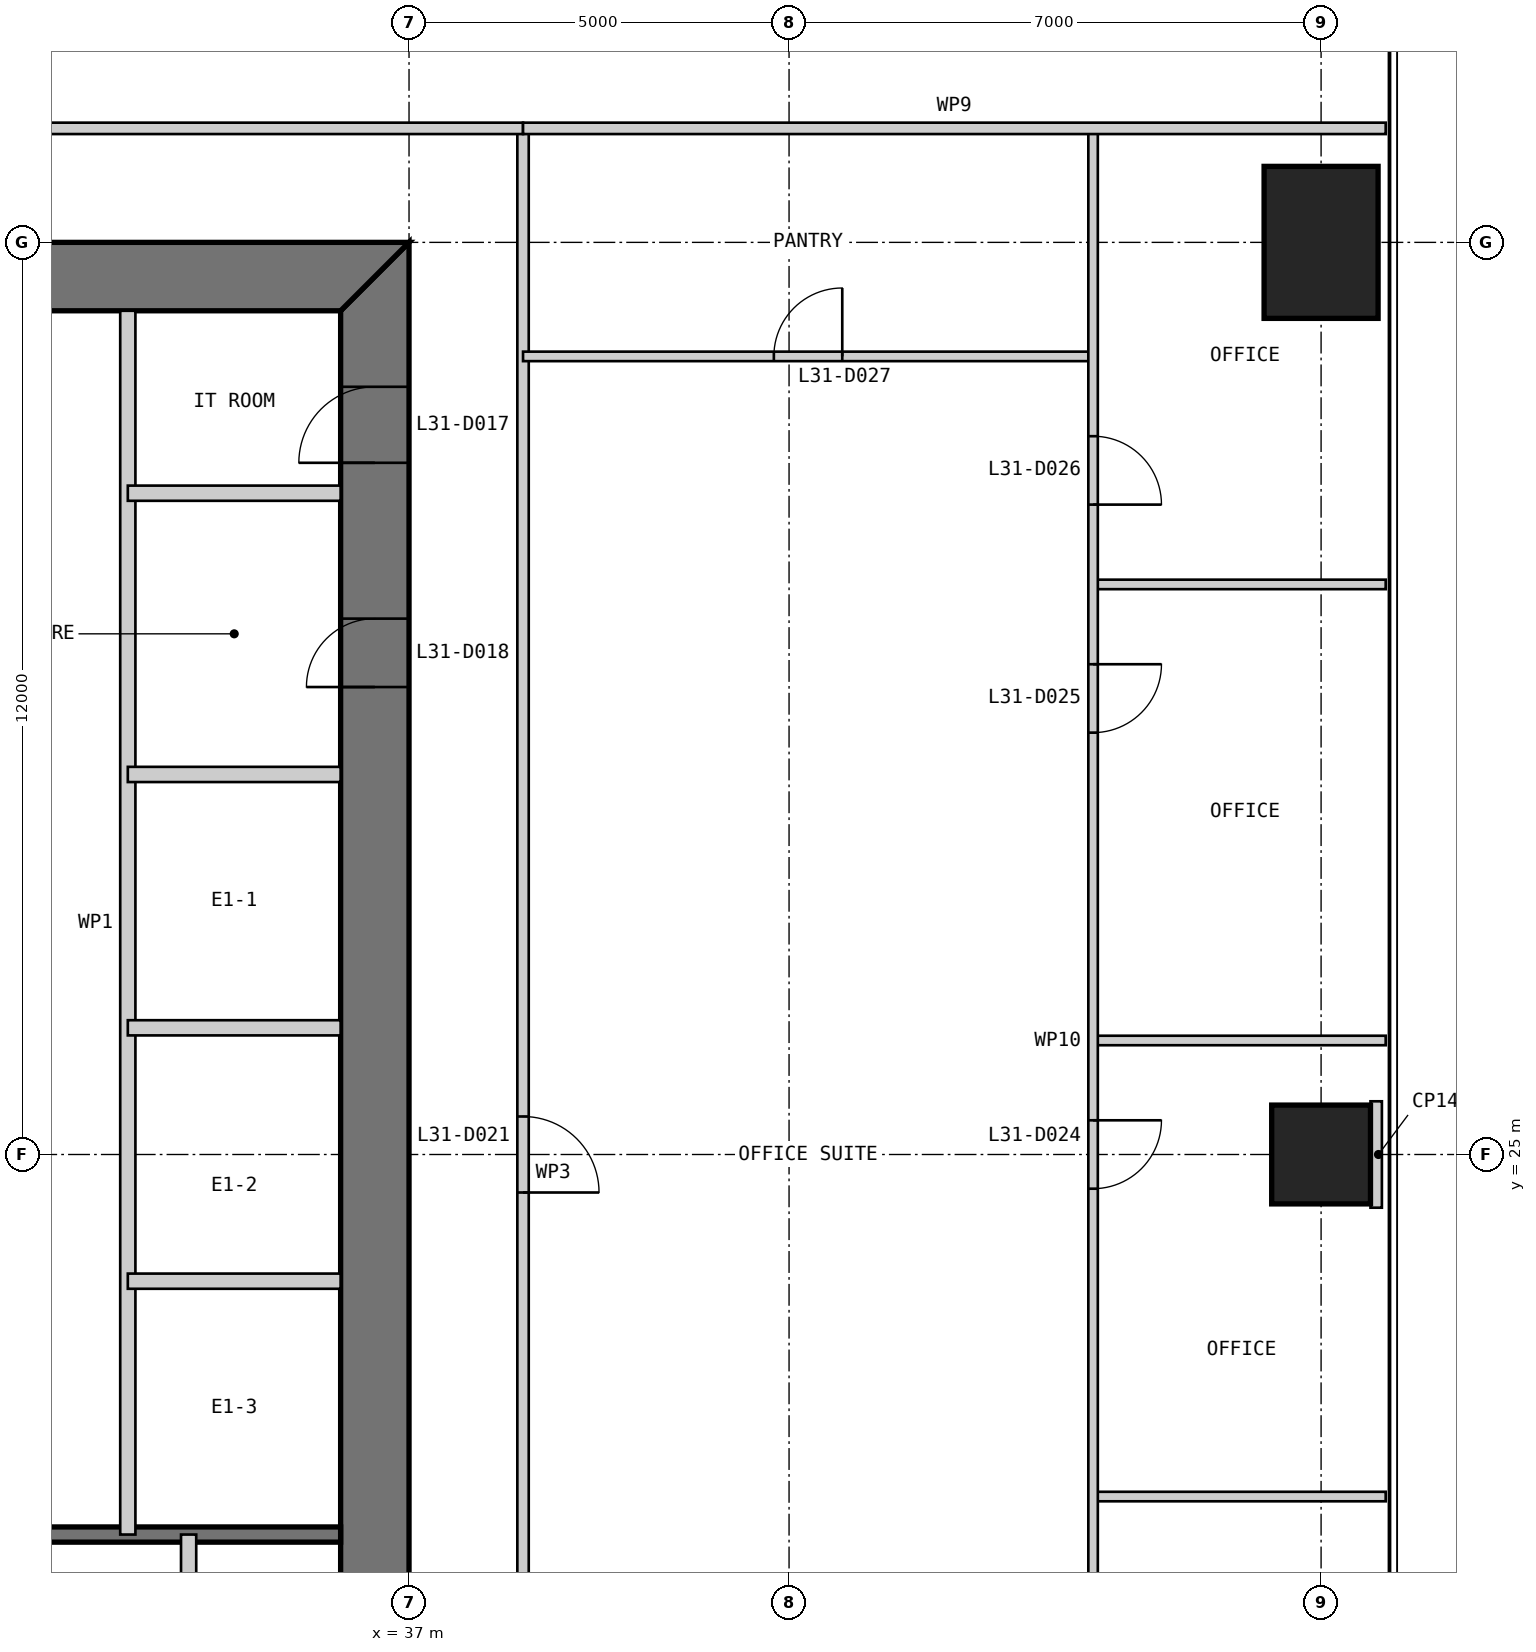
"""IFC4 building model, lengths in metres.
Left out: names, types, materials, properties, quantities, classifications, styles, units other than length and angle.
Written with IfcOpenShell. Run it as: python <this file> out.ifc"""

import sys

from ifc_helpers import new_model, si_unit, direction, frame, frame_2d, origin, origin_2d, place, context, subcontext, project, spatial, polyline, rectangle, outline, extrude, element, fill, save


model = new_model("IFC4")
c1 = context("Model", 3, precision=1e-05, world=origin(), true_north=direction((0.0, 1.0)))
c2 = subcontext(c1, "Body", "Model", "MODEL_VIEW")
j1 = project(units=[si_unit("LENGTHUNIT", "METRE"), si_unit("PLANEANGLEUNIT", "RADIAN")], contexts=[c1])
p1 = place(None, origin())
s1 = spatial("IfcSite", under=j1, at=p1, CompositionType="ELEMENT")
p2 = place(p1, origin())
s2 = spatial("IfcBuilding", under=s1, at=p2, CompositionType="ELEMENT")
p3 = place(p2, frame((0.0, 0.0, 134.4)))
s3 = spatial("IfcBuildingStorey", under=s2, at=p3, CompositionType="ELEMENT", Elevation=134.4)
p4 = place(p3, frame((49.0, 25.0, 0.0), z_axis=(0.0, 0.0, 1.0), x_axis=(1.0, 0.0, 0.0)))
e1 = element("IfcColumn", 1, at=p4, inside=s3, PredefinedType="COLUMN", context=c2, shape_type="SweptSolid", body=[
    extrude(rectangle(XDim=1.3, YDim=1.3, at=origin_2d()), origin(), (0.0, 0.0, 1.0), 4.0),
])
p5 = place(p3, frame((49.0, 37.0, 0.0), z_axis=(0.0, 0.0, 1.0), x_axis=(1.0, 0.0, 0.0)))
e2 = element("IfcColumn", 2, at=p5, inside=s3, PredefinedType="COLUMN", context=c2, shape_type="SweptSolid", body=[
    extrude(rectangle(XDim=1.5, YDim=2.0, at=origin_2d()), origin(), (0.0, 0.0, 1.0), 4.0),
])
p6 = place(p3, frame((36.55, 13.9, 0.0), z_axis=(0.0, 0.0, 1.0), x_axis=(0.0, 1.0, 0.0)))
e3 = element("IfcWall", 3, at=p6, inside=s3, PredefinedType="SHEAR", context=c2, shape_type="SweptSolid", body=[
    extrude(outline(polyline([(-0.9, -0.45), (23.1, -0.45), (22.2, 0.45), (0.0, 0.45), (-0.9, -0.45)])), origin(), (0.0, 0.0, 1.0), 4.0),
])
p7 = place(p6, frame((20.2, 0.0, 0.0)))
e4 = element("IfcOpeningElement", 4, at=p7, cuts=e3, PredefinedType="OPENING", context=c2, shape_type="SweptSolid", body=[
    extrude(rectangle(XDim=1.0, YDim=2.2, at=frame_2d((0.5, 1.1))), frame((0.0, 0.46, 0.0), z_axis=(0.0, -1.0, 0.0), x_axis=(1.0, 0.0, 0.0)), (0.0, 0.0, 1.0), 0.92),
])
p8 = place(p6, frame((17.25, 0.0, 0.0)))
e5 = element("IfcOpeningElement", 5, at=p8, cuts=e3, PredefinedType="OPENING", context=c2, shape_type="SweptSolid", body=[
    extrude(rectangle(XDim=0.9, YDim=2.2, at=frame_2d((0.45, 1.1))), frame((0.0, 0.46, 0.0), z_axis=(0.0, -1.0, 0.0), x_axis=(1.0, 0.0, 0.0)), (0.0, 0.0, 1.0), 0.92),
])
p9 = place(p3, frame((37.0, 36.55, 0.0), z_axis=(0.0, 0.0, 1.0), x_axis=(-1.0, 0.0, 0.0)))
e6 = element("IfcWall", 6, at=p9, inside=s3, PredefinedType="SHEAR", context=c2, shape_type="SweptSolid", body=[
    extrude(outline(polyline([(0.0, -0.45), (24.0, -0.45), (23.1, 0.45), (0.9, 0.45), (0.0, -0.45)])), origin(), (0.0, 0.0, 1.0), 4.0),
])
p10 = place(p9, frame((4.9, 0.0, 0.0)))
e7 = element("IfcOpeningElement", 7, at=p10, cuts=e6, PredefinedType="OPENING", context=c2, shape_type="SweptSolid", body=[
    extrude(rectangle(XDim=1.0, YDim=2.2, at=frame_2d((0.5, 1.1))), frame((0.0, 0.46, 0.0), z_axis=(0.0, -1.0, 0.0), x_axis=(1.0, 0.0, 0.0)), (0.0, 0.0, 1.0), 0.92),
])
p11 = place(p9, frame((8.9, 0.0, 0.0)))
e8 = element("IfcOpeningElement", 8, at=p11, cuts=e6, PredefinedType="OPENING", context=c2, shape_type="SweptSolid", body=[
    extrude(rectangle(XDim=1.1, YDim=2.2, at=frame_2d((0.55, 1.1))), frame((0.0, 0.46, 0.0), z_axis=(0.0, -1.0, 0.0), x_axis=(1.0, 0.0, 0.0)), (0.0, 0.0, 1.0), 0.92),
])
p12 = place(p9, frame((15.05, 0.0, 0.0)))
e9 = element("IfcOpeningElement", 9, at=p12, cuts=e6, PredefinedType="OPENING", context=c2, shape_type="SweptSolid", body=[
    extrude(rectangle(XDim=0.9, YDim=2.2, at=frame_2d((0.45, 1.1))), frame((0.0, 0.46, 0.0), z_axis=(0.0, -1.0, 0.0), x_axis=(1.0, 0.0, 0.0)), (0.0, 0.0, 1.0), 0.92),
])
p13 = place(p9, frame((17.9, 0.0, 0.0)))
e10 = element("IfcOpeningElement", 10, at=p13, cuts=e6, PredefinedType="OPENING", context=c2, shape_type="SweptSolid", body=[
    extrude(rectangle(XDim=1.0, YDim=2.2, at=frame_2d((0.5, 1.1))), frame((0.0, 0.46, 0.0), z_axis=(0.0, -1.0, 0.0), x_axis=(1.0, 0.0, 0.0)), (0.0, 0.0, 1.0), 0.92),
])
p14 = place(p9, frame((21.4, 0.0, 0.0)))
e11 = element("IfcOpeningElement", 11, at=p14, cuts=e6, PredefinedType="OPENING", context=c2, shape_type="SweptSolid", body=[
    extrude(rectangle(XDim=1.0, YDim=2.2, at=frame_2d((0.5, 1.1))), frame((0.0, 0.46, 0.0), z_axis=(0.0, -1.0, 0.0), x_axis=(1.0, 0.0, 0.0)), (0.0, 0.0, 1.0), 0.92),
])
p15 = place(p3, frame((20.3, 20.0, 0.0), z_axis=(0.0, 0.0, 1.0), x_axis=(1.0, 0.0, 0.0)))
e12 = element("IfcWall", 12, at=p15, inside=s3, PredefinedType="SOLIDWALL", context=c2, shape_type="SweptSolid", body=[
    extrude(rectangle(XDim=15.8, YDim=0.2, at=frame_2d((7.9, 0.0))), origin(), (0.0, 0.0, 1.0), 3.8),
])
p16 = place(p3, frame((34.1, 13.9, 0.0), z_axis=(0.0, 0.0, 1.0), x_axis=(0.0, 1.0, 0.0)))
e13 = element("IfcWall", 13, at=p16, inside=s3, PredefinedType="PARTITIONING", context=c2, shape_type="SweptSolid", body=[
    extrude(rectangle(XDim=6.1, YDim=0.2, at=frame_2d((3.05, 0.0))), origin(), (0.0, 0.0, 1.0), 3.8),
])
p17 = place(p3, frame((33.3, 36.1, 0.0), z_axis=(0.0, 0.0, 1.0), x_axis=(0.0, -1.0, 0.0)))
e14 = element("IfcWall", 14, at=p17, inside=s3, PredefinedType="PARTITIONING", context=c2, shape_type="SweptSolid", body=[
    extrude(rectangle(XDim=16.1, YDim=0.2, at=frame_2d((8.05, 0.0))), origin(), (0.0, 0.0, 1.0), 3.8),
])
for number, where, z_axis, x_axis in (
    (15, (36.1, 30.0, 0.0), (0.0, 0.0, 1.0), (-1.0, 0.0, 0.0)),
    (16, (36.1, 26.667, 0.0), (0.0, 0.0, 1.0), (-1.0, 0.0, 0.0)),
    (17, (36.1, 23.333, 0.0), (0.0, 0.0, 1.0), (-1.0, 0.0, 0.0)),
    (18, (36.1, 33.7, 0.0), (0.0, 0.0, 1.0), (-1.0, 0.0, 0.0)),
):
    element("IfcWall", number, at=place(p3, frame(where, z_axis=z_axis, x_axis=x_axis)), inside=s3, PredefinedType="PARTITIONING", context=c2, shape_type="SweptSolid", body=[
        extrude(rectangle(XDim=2.8, YDim=0.2, at=frame_2d((1.4, 0.0))), origin(), (0.0, 0.0, 1.0), 3.8),
    ])
p18 = place(p3, frame((38.5, 11.5, 0.0), z_axis=(0.0, 0.0, 1.0), x_axis=(0.0, 1.0, 0.0)))
e19 = element("IfcWall", 19, at=p18, inside=s3, PredefinedType="PARTITIONING", context=c2, shape_type="SweptSolid", body=[
    extrude(rectangle(XDim=27.0, YDim=0.15, at=frame_2d((13.5, 0.0))), origin(), (0.0, 0.0, 1.0), 3.85),
])
p19 = place(p18, frame((13.0, 0.0, 0.0)))
e20 = element("IfcOpeningElement", 20, at=p19, cuts=e19, PredefinedType="OPENING", context=c2, shape_type="SweptSolid", body=[
    extrude(rectangle(XDim=1.0, YDim=2.2, at=frame_2d((0.5, 1.1))), frame((0.0, 0.085, 0.0), z_axis=(0.0, -1.0, 0.0), x_axis=(1.0, 0.0, 0.0)), (0.0, 0.0, 1.0), 0.17),
])
for number, where, z_axis, x_axis in (
    (21, (49.85, 20.5, 0.0), (0.0, 0.0, 1.0), (-1.0, 0.0, 0.0)),
    (22, (49.85, 26.5, 0.0), (0.0, 0.0, 1.0), (-1.0, 0.0, 0.0)),
    (23, (49.85, 32.5, 0.0), (0.0, 0.0, 1.0), (-1.0, 0.0, 0.0)),
):
    element("IfcWall", number, at=place(p3, frame(where, z_axis=z_axis, x_axis=x_axis)), inside=s3, PredefinedType="PARTITIONING", context=c2, shape_type="SweptSolid", body=[
        extrude(rectangle(XDim=3.85, YDim=0.125, at=frame_2d((1.925, 0.0))), origin(), (0.0, 0.0, 1.0), 3.85),
    ])
p20 = place(p3, frame((46.0, 35.5, 0.0), z_axis=(0.0, 0.0, 1.0), x_axis=(-1.0, 0.0, 0.0)))
e24 = element("IfcWall", 24, at=p20, inside=s3, PredefinedType="PARTITIONING", context=c2, shape_type="SweptSolid", body=[
    extrude(rectangle(XDim=7.5, YDim=0.125, at=frame_2d((3.75, 0.0))), origin(), (0.0, 0.0, 1.0), 3.85),
])
p21 = place(p20, frame((3.3, 0.0, 0.0)))
e25 = element("IfcOpeningElement", 25, at=p21, cuts=e24, PredefinedType="OPENING", context=c2, shape_type="SweptSolid", body=[
    extrude(rectangle(XDim=0.9, YDim=2.2, at=frame_2d((0.45, 1.1))), frame((0.0, 0.073, 0.0), z_axis=(0.0, -1.0, 0.0), x_axis=(1.0, 0.0, 0.0)), (0.0, 0.0, 1.0), 0.145),
])
p22 = place(p3, frame((46.0, 14.5, 0.0), z_axis=(0.0, 0.0, 1.0), x_axis=(0.0, 1.0, 0.0)))
e26 = element("IfcWall", 26, at=p22, inside=s3, PredefinedType="PARTITIONING", context=c2, shape_type="SweptSolid", body=[
    extrude(rectangle(XDim=24.0, YDim=0.125, at=frame_2d((12.0, 0.0))), origin(), (0.0, 0.0, 1.0), 3.238),
])
p23 = place(p22, frame((4.05, 0.0, 0.0)))
e27 = element("IfcOpeningElement", 27, at=p23, cuts=e26, PredefinedType="OPENING", context=c2, shape_type="SweptSolid", body=[
    extrude(rectangle(XDim=0.9, YDim=2.2, at=frame_2d((0.45, 1.1))), frame((0.0, 0.073, 0.0), z_axis=(0.0, -1.0, 0.0), x_axis=(1.0, 0.0, 0.0)), (0.0, 0.0, 1.0), 0.145),
])
p24 = place(p22, frame((10.05, 0.0, 0.0)))
e28 = element("IfcOpeningElement", 28, at=p24, cuts=e26, PredefinedType="OPENING", context=c2, shape_type="SweptSolid", body=[
    extrude(rectangle(XDim=0.9, YDim=2.2, at=frame_2d((0.45, 1.1))), frame((0.0, 0.073, 0.0), z_axis=(0.0, -1.0, 0.0), x_axis=(1.0, 0.0, 0.0)), (0.0, 0.0, 1.0), 0.145),
])
p25 = place(p22, frame((16.05, 0.0, 0.0)))
e29 = element("IfcOpeningElement", 29, at=p25, cuts=e26, PredefinedType="OPENING", context=c2, shape_type="SweptSolid", body=[
    extrude(rectangle(XDim=0.9, YDim=2.2, at=frame_2d((0.45, 1.1))), frame((0.0, 0.073, 0.0), z_axis=(0.0, -1.0, 0.0), x_axis=(1.0, 0.0, 0.0)), (0.0, 0.0, 1.0), 0.145),
])
p26 = place(p22, frame((19.05, 0.0, 0.0)))
e30 = element("IfcOpeningElement", 30, at=p26, cuts=e26, PredefinedType="OPENING", context=c2, shape_type="SweptSolid", body=[
    extrude(rectangle(XDim=0.9, YDim=2.2, at=frame_2d((0.45, 1.1))), frame((0.0, 0.073, 0.0), z_axis=(0.0, -1.0, 0.0), x_axis=(1.0, 0.0, 0.0)), (0.0, 0.0, 1.0), 0.145),
])
p27 = place(p3, frame((38.5, 38.5, 0.0), z_axis=(0.0, 0.0, 1.0), x_axis=(-1.0, 0.0, 0.0)))
e31 = element("IfcWall", 31, at=p27, inside=s3, PredefinedType="PARTITIONING", context=c2, shape_type="SweptSolid", body=[
    extrude(rectangle(XDim=27.0, YDim=0.15, at=frame_2d((13.5, 0.0))), origin(), (0.0, 0.0, 1.0), 3.85),
])
p28 = place(p27, frame((11.5, 0.0, 0.0)))
e32 = element("IfcOpeningElement", 32, at=p28, cuts=e31, PredefinedType="OPENING", context=c2, shape_type="SweptSolid", body=[
    extrude(rectangle(XDim=1.0, YDim=2.2, at=frame_2d((0.5, 1.1))), frame((0.0, 0.085, 0.0), z_axis=(0.0, -1.0, 0.0), x_axis=(1.0, 0.0, 0.0)), (0.0, 0.0, 1.0), 0.17),
])
p29 = place(p3, frame((49.85, 38.5, 0.0), z_axis=(0.0, 0.0, 1.0), x_axis=(-1.0, 0.0, 0.0)))
e33 = element("IfcWall", 33, at=p29, inside=s3, PredefinedType="PARTITIONING", context=c2, shape_type="SweptSolid", body=[
    extrude(rectangle(XDim=11.35, YDim=0.15, at=frame_2d((5.675, 0.0))), origin(), (0.0, 0.0, 1.0), 3.85),
])
p30 = place(p3, frame((49.8, 25.0, 0.0), z_axis=(0.0, 0.0, 1.0), x_axis=(-1.0, 0.0, 0.0)))
e34 = element("IfcWall", 34, at=p30, inside=s3, PredefinedType="PARTITIONING", context=c2, shape_type="SweptSolid", body=[
    extrude(rectangle(XDim=0.15, YDim=1.4, at=frame_2d((0.075, 0.0))), origin(), (0.0, 0.0, 1.0), 3.85),
])
p31 = place(p7, origin())
e35 = element("IfcDoor", 35, at=p31, inside=s3, OperationType="SINGLE_SWING_LEFT", PredefinedType="DOOR", context=c2, shape_type="SweptSolid", body=[
    extrude(rectangle(XDim=1.0, YDim=2.2, at=frame_2d((0.5, 1.1))), frame((0.0, 0.025, 0.0), z_axis=(0.0, -1.0, 0.0), x_axis=(1.0, 0.0, 0.0)), (0.0, 0.0, 1.0), 0.05),
    extrude(outline(polyline([(0.0, 0.0), (0.04, 0.0), (0.04, 2.16), (0.96, 2.16), (0.96, 0.0), (1.0, 0.0), (1.0, 2.2), (0.0, 2.2), (0.0, 0.0)])), frame((0.0, 0.3, 0.0), z_axis=(0.0, -1.0, 0.0), x_axis=(1.0, 0.0, 0.0)), (0.0, 0.0, 1.0), 0.6),
])
fill(e4, e35)
p32 = place(p8, origin())
e36 = element("IfcDoor", 36, at=p32, inside=s3, OperationType="SINGLE_SWING_LEFT", PredefinedType="DOOR", context=c2, shape_type="SweptSolid", body=[
    extrude(rectangle(XDim=0.9, YDim=2.2, at=frame_2d((0.45, 1.1))), frame((0.0, 0.025, 0.0), z_axis=(0.0, -1.0, 0.0), x_axis=(1.0, 0.0, 0.0)), (0.0, 0.0, 1.0), 0.05),
    extrude(outline(polyline([(0.0, 0.0), (0.04, 0.0), (0.04, 2.16), (0.86, 2.16), (0.86, 0.0), (0.9, 0.0), (0.9, 2.2), (0.0, 2.2), (0.0, 0.0)])), frame((0.0, 0.3, 0.0), z_axis=(0.0, -1.0, 0.0), x_axis=(1.0, 0.0, 0.0)), (0.0, 0.0, 1.0), 0.6),
])
fill(e5, e36)
p33 = place(p19, frame((1.0, 0.0, 0.0), z_axis=(0.0, 0.0, 1.0), x_axis=(-1.0, 0.0, 0.0)))
e37 = element("IfcDoor", 37, at=p33, inside=s3, OperationType="SINGLE_SWING_RIGHT", PredefinedType="DOOR", context=c2, shape_type="SweptSolid", body=[
    extrude(rectangle(XDim=1.0, YDim=2.2, at=frame_2d((0.5, 1.1))), frame((0.0, 0.025, 0.0), z_axis=(0.0, -1.0, 0.0), x_axis=(1.0, 0.0, 0.0)), (0.0, 0.0, 1.0), 0.05),
])
fill(e20, e37)
p34 = place(p24, frame((0.9, 0.0, 0.0), z_axis=(0.0, 0.0, 1.0), x_axis=(-1.0, 0.0, 0.0)))
e38 = element("IfcDoor", 38, at=p34, inside=s3, OperationType="SINGLE_SWING_LEFT", PredefinedType="DOOR", context=c2, shape_type="SweptSolid", body=[
    extrude(rectangle(XDim=0.9, YDim=2.2, at=frame_2d((0.45, 1.1))), frame((0.0, 0.025, 0.0), z_axis=(0.0, -1.0, 0.0), x_axis=(1.0, 0.0, 0.0)), (0.0, 0.0, 1.0), 0.05),
])
fill(e28, e38)
p35 = place(p25, frame((0.9, 0.0, 0.0), z_axis=(0.0, 0.0, 1.0), x_axis=(-1.0, 0.0, 0.0)))
e39 = element("IfcDoor", 39, at=p35, inside=s3, OperationType="SINGLE_SWING_LEFT", PredefinedType="DOOR", context=c2, shape_type="SweptSolid", body=[
    extrude(rectangle(XDim=0.9, YDim=2.2, at=frame_2d((0.45, 1.1))), frame((0.0, 0.025, 0.0), z_axis=(0.0, -1.0, 0.0), x_axis=(1.0, 0.0, 0.0)), (0.0, 0.0, 1.0), 0.05),
])
fill(e29, e39)
p36 = place(p26, frame((0.9, 0.0, 0.0), z_axis=(0.0, 0.0, 1.0), x_axis=(-1.0, 0.0, 0.0)))
e40 = element("IfcDoor", 40, at=p36, inside=s3, OperationType="SINGLE_SWING_RIGHT", PredefinedType="DOOR", context=c2, shape_type="SweptSolid", body=[
    extrude(rectangle(XDim=0.9, YDim=2.2, at=frame_2d((0.45, 1.1))), frame((0.0, 0.025, 0.0), z_axis=(0.0, -1.0, 0.0), x_axis=(1.0, 0.0, 0.0)), (0.0, 0.0, 1.0), 0.05),
])
fill(e30, e40)
p37 = place(p21, frame((0.9, 0.0, 0.0), z_axis=(0.0, 0.0, 1.0), x_axis=(-1.0, 0.0, 0.0)))
e41 = element("IfcDoor", 41, at=p37, inside=s3, OperationType="SINGLE_SWING_RIGHT", PredefinedType="DOOR", context=c2, shape_type="SweptSolid", body=[
    extrude(rectangle(XDim=0.9, YDim=2.2, at=frame_2d((0.45, 1.1))), frame((0.0, 0.025, 0.0), z_axis=(0.0, -1.0, 0.0), x_axis=(1.0, 0.0, 0.0)), (0.0, 0.0, 1.0), 0.05),
])
fill(e25, e41)
save(model, sys.argv[1])
